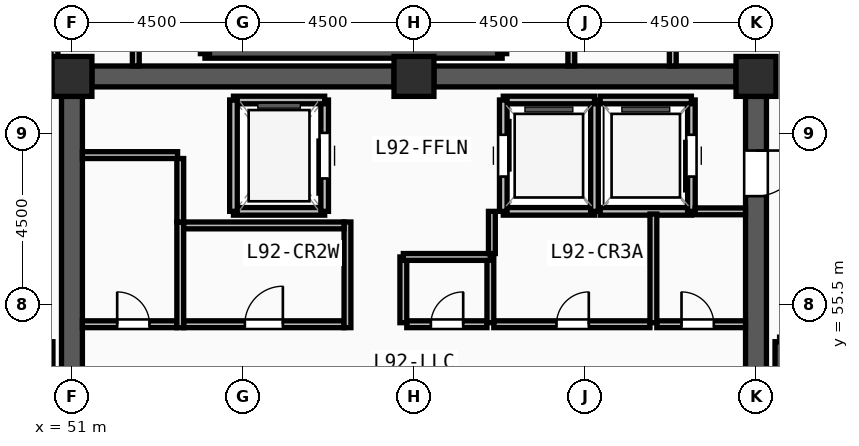
"""IFC4 building model, lengths in metres.
Left out: names, types, materials, properties, quantities, classifications, styles, units other than length and angle.
Written with IfcOpenShell. Run it as: python <this file> out.ifc"""

import sys

from ifc_helpers import new_model, si_unit, direction, frame, frame_2d, origin, origin_2d, place, context, subcontext, project, spatial, rectangle, extrude, source, transform, mapped, element, fill, save


model = new_model("IFC4")
c1 = context("Model", 3, precision=1e-05, world=origin(), true_north=direction((0.0, 1.0)))
c2 = subcontext(c1, "Body", "Model", "MODEL_VIEW")
j1 = project(units=[si_unit("LENGTHUNIT", "METRE"), si_unit("PLANEANGLEUNIT", "RADIAN")], contexts=[c1])
p1 = place(None, origin())
s1 = spatial("IfcSite", under=j1, at=p1, CompositionType="ELEMENT")
p2 = place(p1, origin())
s2 = spatial("IfcBuilding", under=s1, at=p2, CompositionType="ELEMENT")
p3 = place(p2, frame((0.0, 0.0, 355.8)))
s3 = spatial("IfcBuildingStorey", under=s2, at=p3, CompositionType="ELEMENT", Elevation=355.8)
m1 = source(origin(), c2, "Body", "SweptSolid", [
    extrude(rectangle(XDim=1.05, YDim=1.05, at=origin_2d()), origin(), (0.0, 0.0, 1.0), 4.8),
])
for number, where, z_axis, x_axis in (
    (1, (69.0, 61.5, 0.0), (0.0, 0.0, 1.0), (1.0, 0.0, 0.0)),
    (2, (60.0, 61.5, 0.0), (0.0, 0.0, 1.0), (1.0, 0.0, 0.0)),
    (3, (51.0, 61.5, 0.0), (0.0, 0.0, 1.0), (1.0, 0.0, 0.0)),
):
    element("IfcColumn", number, at=place(p3, frame(where, z_axis=z_axis, x_axis=x_axis)), inside=s3, PredefinedType="COLUMN", context=c2, shape_type="MappedRepresentation", body=[
        mapped(m1, transform((0.0, 0.0, 0.0), x_axis=(1.0, 0.0, 0.0), y_axis=(0.0, 1.0, 0.0), z_axis=(0.0, 0.0, 1.0), scale=1.0)),
    ])
for number, where, z_axis, x_axis in (
    (4, (51.525, 61.5, 0.0), (0.0, 0.0, 1.0), (1.0, 0.0, 0.0)),
    (5, (60.525, 61.5, 0.0), (0.0, 0.0, 1.0), (1.0, 0.0, 0.0)),
):
    element("IfcWall", number, at=place(p3, frame(where, z_axis=z_axis, x_axis=x_axis)), inside=s3, PredefinedType="SHEAR", context=c2, shape_type="SweptSolid", body=[
        extrude(rectangle(XDim=7.95, YDim=0.55, at=frame_2d((3.975, 0.0))), origin(), (0.0, 0.0, 1.0), 4.35),
    ])
p4 = place(p3, frame((69.0, 60.975, 0.0), z_axis=(0.0, 0.0, 1.0), x_axis=(0.0, -1.0, 0.0)))
e6 = element("IfcWall", 6, at=p4, inside=s3, PredefinedType="SHEAR", context=c2, shape_type="SweptSolid", body=[
    extrude(rectangle(XDim=13.95, YDim=0.55, at=frame_2d((6.975, 0.0))), origin(), (0.0, 0.0, 1.0), 4.35),
])
m2 = source(origin(), c2, "Body", "SweptSolid", [
    extrude(rectangle(XDim=1.2, YDim=2.2, at=frame_2d((0.6, 1.1))), frame((0.0, 0.285, 0.0), z_axis=(0.0, -1.0, 0.0), x_axis=(1.0, 0.0, 0.0)), (0.0, 0.0, 1.0), 0.57),
])
p5 = place(p4, frame((1.425, 0.0, 0.0)))
e7 = element("IfcOpeningElement", 7, at=p5, cuts=e6, PredefinedType="OPENING", context=c2, shape_type="MappedRepresentation", body=[
    mapped(m2, transform((0.0, 0.0, 0.0), x_axis=(1.0, 0.0, 0.0), y_axis=(0.0, 1.0, 0.0), z_axis=(0.0, 0.0, 1.0), scale=1.0)),
])
p6 = place(p3, frame((51.0, 47.025, 0.0), z_axis=(0.0, 0.0, 1.0), x_axis=(0.0, 1.0, 0.0)))
e8 = element("IfcWall", 8, at=p6, inside=s3, PredefinedType="SHEAR", context=c2, shape_type="SweptSolid", body=[
    extrude(rectangle(XDim=13.95, YDim=0.55, at=frame_2d((6.975, 0.0))), origin(), (0.0, 0.0, 1.0), 4.35),
])
for number, where, z_axis, x_axis in (
    (9, (50.38, 46.7, 0.0), (0.0, 0.0, 1.0), (0.0, 1.0, 0.0)),
    (10, (69.62, 54.52, 0.0), (0.0, 0.0, 1.0), (0.0, -1.0, 0.0)),
    (11, (54.5, 62.1, 0.0), (0.0, 0.0, 1.0), (1.0, 0.0, 0.0)),
):
    element("IfcWall", number, at=place(p3, frame(where, z_axis=z_axis, x_axis=x_axis)), inside=s3, PredefinedType="SOLIDWALL", context=c2, shape_type="SweptSolid", body=[
        extrude(rectangle(XDim=7.82, YDim=0.24, at=frame_2d((3.91, 0.0))), origin(), (0.0, 0.0, 1.0), 4.35),
    ])
for number, where, z_axis, x_axis in (
    (12, (62.32, 62.1, 0.0), (0.0, 0.0, 1.0), (0.0, 1.0, 0.0)),
    (13, (54.5, 65.54, 0.0), (0.0, 0.0, 1.0), (0.0, -1.0, 0.0)),
):
    element("IfcWall", number, at=place(p3, frame(where, z_axis=z_axis, x_axis=x_axis)), inside=s3, PredefinedType="SOLIDWALL", context=c2, shape_type="SweptSolid", body=[
        extrude(rectangle(XDim=3.44, YDim=0.24, at=frame_2d((1.72, 0.0))), origin(), (0.0, 0.0, 1.0), 4.35),
    ])
p7 = place(p3, frame((55.25, 57.95, 0.0), z_axis=(0.0, 0.0, 1.0), x_axis=(1.0, 0.0, 0.0)))
e14 = element("IfcWall", 14, at=p7, inside=s3, PredefinedType="SOLIDWALL", context=c2, shape_type="SweptSolid", body=[
    extrude(rectangle(XDim=2.4, YDim=0.2, at=frame_2d((1.2, 0.0))), origin(), (0.0, 0.0, 1.0), 4.35),
])
p8 = place(p3, frame((57.65, 57.95, 0.0), z_axis=(0.0, 0.0, 1.0), x_axis=(0.0, 1.0, 0.0)))
e15 = element("IfcWall", 15, at=p8, inside=s3, PredefinedType="SOLIDWALL", context=c2, shape_type="SweptSolid", body=[
    extrude(rectangle(XDim=2.93, YDim=0.2, at=frame_2d((1.465, 0.0))), origin(), (0.0, 0.0, 1.0), 4.35),
])
m3 = source(origin(), c2, "Body", "SweptSolid", [
    extrude(rectangle(XDim=1.2, YDim=2.3, at=frame_2d((0.6, 1.15))), frame((0.0, 0.11, 0.0), z_axis=(0.0, -1.0, 0.0), x_axis=(1.0, 0.0, 0.0)), (0.0, 0.0, 1.0), 0.22),
])
p9 = place(p8, frame((0.865, 0.0, 0.0)))
e16 = element("IfcOpeningElement", 16, at=p9, cuts=e15, PredefinedType="OPENING", context=c2, shape_type="MappedRepresentation", body=[
    mapped(m3, transform((0.0, 0.0, 0.0), x_axis=(1.0, 0.0, 0.0), y_axis=(0.0, 1.0, 0.0), z_axis=(0.0, 0.0, 1.0), scale=1.0)),
])
p10 = place(p3, frame((57.65, 60.88, 0.0), z_axis=(0.0, 0.0, 1.0), x_axis=(-1.0, 0.0, 0.0)))
e17 = element("IfcWall", 17, at=p10, inside=s3, PredefinedType="SOLIDWALL", context=c2, shape_type="SweptSolid", body=[
    extrude(rectangle(XDim=2.4, YDim=0.2, at=frame_2d((1.2, 0.0))), origin(), (0.0, 0.0, 1.0), 4.35),
])
p11 = place(p3, frame((55.25, 60.88, 0.0), z_axis=(0.0, 0.0, 1.0), x_axis=(0.0, -1.0, 0.0)))
e18 = element("IfcWall", 18, at=p11, inside=s3, PredefinedType="SOLIDWALL", context=c2, shape_type="SweptSolid", body=[
    extrude(rectangle(XDim=2.93, YDim=0.2, at=frame_2d((1.465, 0.0))), origin(), (0.0, 0.0, 1.0), 4.35),
])
p12 = place(p3, frame((62.35, 57.95, 0.0), z_axis=(0.0, 0.0, 1.0), x_axis=(1.0, 0.0, 0.0)))
e19 = element("IfcWall", 19, at=p12, inside=s3, PredefinedType="SOLIDWALL", context=c2, shape_type="SweptSolid", body=[
    extrude(rectangle(XDim=2.4, YDim=0.2, at=frame_2d((1.2, 0.0))), origin(), (0.0, 0.0, 1.0), 4.35),
])
p13 = place(p3, frame((64.75, 57.95, 0.0), z_axis=(0.0, 0.0, 1.0), x_axis=(0.0, 1.0, 0.0)))
e20 = element("IfcWall", 20, at=p13, inside=s3, PredefinedType="SOLIDWALL", context=c2, shape_type="SweptSolid", body=[
    extrude(rectangle(XDim=2.93, YDim=0.2, at=frame_2d((1.465, 0.0))), origin(), (0.0, 0.0, 1.0), 4.35),
])
p14 = place(p3, frame((64.75, 60.88, 0.0), z_axis=(0.0, 0.0, 1.0), x_axis=(-1.0, 0.0, 0.0)))
e21 = element("IfcWall", 21, at=p14, inside=s3, PredefinedType="SOLIDWALL", context=c2, shape_type="SweptSolid", body=[
    extrude(rectangle(XDim=2.4, YDim=0.2, at=frame_2d((1.2, 0.0))), origin(), (0.0, 0.0, 1.0), 4.35),
])
p15 = place(p3, frame((62.35, 60.88, 0.0), z_axis=(0.0, 0.0, 1.0), x_axis=(0.0, -1.0, 0.0)))
e22 = element("IfcWall", 22, at=p15, inside=s3, PredefinedType="SOLIDWALL", context=c2, shape_type="SweptSolid", body=[
    extrude(rectangle(XDim=2.93, YDim=0.2, at=frame_2d((1.465, 0.0))), origin(), (0.0, 0.0, 1.0), 4.35),
])
m4 = source(origin(), c2, "Body", "SweptSolid", [
    extrude(rectangle(XDim=1.1, YDim=2.2, at=frame_2d((0.55, 1.1))), frame((0.0, 0.11, 0.0), z_axis=(0.0, -1.0, 0.0), x_axis=(1.0, 0.0, 0.0)), (0.0, 0.0, 1.0), 0.22),
])
p16 = place(p15, frame((0.915, 0.0, 0.0)))
e23 = element("IfcOpeningElement", 23, at=p16, cuts=e22, PredefinedType="OPENING", context=c2, shape_type="MappedRepresentation", body=[
    mapped(m4, transform((0.0, 0.0, 0.0), x_axis=(1.0, 0.0, 0.0), y_axis=(0.0, 1.0, 0.0), z_axis=(0.0, 0.0, 1.0), scale=1.0)),
])
p17 = place(p3, frame((64.9, 57.95, 0.0), z_axis=(0.0, 0.0, 1.0), x_axis=(1.0, 0.0, 0.0)))
e24 = element("IfcWall", 24, at=p17, inside=s3, PredefinedType="SOLIDWALL", context=c2, shape_type="SweptSolid", body=[
    extrude(rectangle(XDim=2.4, YDim=0.2, at=frame_2d((1.2, 0.0))), origin(), (0.0, 0.0, 1.0), 4.35),
])
p18 = place(p3, frame((67.3, 57.95, 0.0), z_axis=(0.0, 0.0, 1.0), x_axis=(0.0, 1.0, 0.0)))
e25 = element("IfcWall", 25, at=p18, inside=s3, PredefinedType="SOLIDWALL", context=c2, shape_type="SweptSolid", body=[
    extrude(rectangle(XDim=2.93, YDim=0.2, at=frame_2d((1.465, 0.0))), origin(), (0.0, 0.0, 1.0), 4.35),
])
p19 = place(p18, frame((0.915, 0.0, 0.0)))
e26 = element("IfcOpeningElement", 26, at=p19, cuts=e25, PredefinedType="OPENING", context=c2, shape_type="MappedRepresentation", body=[
    mapped(m4, transform((0.0, 0.0, 0.0), x_axis=(1.0, 0.0, 0.0), y_axis=(0.0, 1.0, 0.0), z_axis=(0.0, 0.0, 1.0), scale=1.0)),
])
p20 = place(p3, frame((67.3, 60.88, 0.0), z_axis=(0.0, 0.0, 1.0), x_axis=(-1.0, 0.0, 0.0)))
e27 = element("IfcWall", 27, at=p20, inside=s3, PredefinedType="SOLIDWALL", context=c2, shape_type="SweptSolid", body=[
    extrude(rectangle(XDim=2.4, YDim=0.2, at=frame_2d((1.2, 0.0))), origin(), (0.0, 0.0, 1.0), 4.35),
])
p21 = place(p3, frame((53.94, 54.98, 0.0), z_axis=(0.0, 0.0, 1.0), x_axis=(1.0, 0.0, 0.0)))
e28 = element("IfcWall", 28, at=p21, inside=s3, PredefinedType="PARTITIONING", context=c2, shape_type="SweptSolid", body=[
    extrude(rectangle(XDim=4.22, YDim=0.18, at=frame_2d((2.11, 0.0))), origin(), (0.0, 0.0, 1.0), 4.35),
])
m5 = source(origin(), c2, "Body", "SweptSolid", [
    extrude(rectangle(XDim=1.0, YDim=2.2, at=frame_2d((0.5, 1.1))), frame((0.0, 0.1, 0.0), z_axis=(0.0, -1.0, 0.0), x_axis=(1.0, 0.0, 0.0)), (0.0, 0.0, 1.0), 0.2),
])
p22 = place(p21, frame((1.61, 0.0, 0.0)))
e29 = element("IfcOpeningElement", 29, at=p22, cuts=e28, PredefinedType="OPENING", context=c2, shape_type="MappedRepresentation", body=[
    mapped(m5, transform((0.0, 0.0, 0.0), x_axis=(1.0, 0.0, 0.0), y_axis=(0.0, 1.0, 0.0), z_axis=(0.0, 0.0, 1.0), scale=1.0)),
])
p23 = place(p3, frame((51.275, 54.98, 0.0), z_axis=(0.0, 0.0, 1.0), x_axis=(1.0, 0.0, 0.0)))
e30 = element("IfcWall", 30, at=p23, inside=s3, PredefinedType="PARTITIONING", context=c2, shape_type="SweptSolid", body=[
    extrude(rectangle(XDim=2.485, YDim=0.18, at=frame_2d((1.243, 0.0))), origin(), (0.0, 0.0, 1.0), 4.35),
])
m6 = source(origin(), c2, "Body", "SweptSolid", [
    extrude(rectangle(XDim=0.85, YDim=2.1, at=frame_2d((0.425, 1.05))), frame((0.0, 0.1, 0.0), z_axis=(0.0, -1.0, 0.0), x_axis=(1.0, 0.0, 0.0)), (0.0, 0.0, 1.0), 0.2),
])
p24 = place(p23, frame((0.915, 0.0, 0.0)))
e31 = element("IfcOpeningElement", 31, at=p24, cuts=e30, PredefinedType="OPENING", context=c2, shape_type="MappedRepresentation", body=[
    mapped(m6, transform((0.0, 0.0, 0.0), x_axis=(1.0, 0.0, 0.0), y_axis=(0.0, 1.0, 0.0), z_axis=(0.0, 0.0, 1.0), scale=1.0)),
])
p25 = place(p3, frame((62.1, 54.98, 0.0), z_axis=(0.0, 0.0, 1.0), x_axis=(1.0, 0.0, 0.0)))
e32 = element("IfcWall", 32, at=p25, inside=s3, PredefinedType="PARTITIONING", context=c2, shape_type="SweptSolid", body=[
    extrude(rectangle(XDim=4.11, YDim=0.18, at=frame_2d((2.055, 0.0))), origin(), (0.0, 0.0, 1.0), 4.35),
])
p26 = place(p25, frame((1.65, 0.0, 0.0)))
e33 = element("IfcOpeningElement", 33, at=p26, cuts=e32, PredefinedType="OPENING", context=c2, shape_type="MappedRepresentation", body=[
    mapped(m6, transform((0.0, 0.0, 0.0), x_axis=(1.0, 0.0, 0.0), y_axis=(0.0, 1.0, 0.0), z_axis=(0.0, 0.0, 1.0), scale=1.0)),
])
p27 = place(p3, frame((66.39, 54.98, 0.0), z_axis=(0.0, 0.0, 1.0), x_axis=(1.0, 0.0, 0.0)))
e34 = element("IfcWall", 34, at=p27, inside=s3, PredefinedType="PARTITIONING", context=c2, shape_type="SweptSolid", body=[
    extrude(rectangle(XDim=2.335, YDim=0.18, at=frame_2d((1.167, 0.0))), origin(), (0.0, 0.0, 1.0), 4.35),
])
p28 = place(p27, frame((0.65, 0.0, 0.0)))
e35 = element("IfcOpeningElement", 35, at=p28, cuts=e34, PredefinedType="OPENING", context=c2, shape_type="MappedRepresentation", body=[
    mapped(m6, transform((0.0, 0.0, 0.0), x_axis=(1.0, 0.0, 0.0), y_axis=(0.0, 1.0, 0.0), z_axis=(0.0, 0.0, 1.0), scale=1.0)),
])
p29 = place(p3, frame((59.81, 54.98, 0.0), z_axis=(0.0, 0.0, 1.0), x_axis=(1.0, 0.0, 0.0)))
e36 = element("IfcWall", 36, at=p29, inside=s3, PredefinedType="PARTITIONING", context=c2, shape_type="SweptSolid", body=[
    extrude(rectangle(XDim=2.11, YDim=0.18, at=frame_2d((1.055, 0.0))), origin(), (0.0, 0.0, 1.0), 4.35),
])
p30 = place(p29, frame((0.635, 0.0, 0.0)))
e37 = element("IfcOpeningElement", 37, at=p30, cuts=e36, PredefinedType="OPENING", context=c2, shape_type="MappedRepresentation", body=[
    mapped(m6, transform((0.0, 0.0, 0.0), x_axis=(1.0, 0.0, 0.0), y_axis=(0.0, 1.0, 0.0), z_axis=(0.0, 0.0, 1.0), scale=1.0)),
])
p31 = place(p3, frame((51.275, 59.43, 0.0), z_axis=(0.0, 0.0, 1.0), x_axis=(1.0, 0.0, 0.0)))
e38 = element("IfcWall", 38, at=p31, inside=s3, PredefinedType="PARTITIONING", context=c2, shape_type="SweptSolid", body=[
    extrude(rectangle(XDim=2.505, YDim=0.18, at=frame_2d((1.252, 0.0))), origin(), (0.0, 0.0, 1.0), 4.35),
])
p32 = place(p3, frame((66.3, 55.02, 0.0), z_axis=(0.0, 0.0, 1.0), x_axis=(0.0, 1.0, 0.0)))
e39 = element("IfcWall", 39, at=p32, inside=s3, PredefinedType="PARTITIONING", context=c2, shape_type="SweptSolid", body=[
    extrude(rectangle(XDim=2.86, YDim=0.18, at=frame_2d((1.43, 0.0))), origin(), (0.0, 0.0, 1.0), 4.35),
])
for number, where, z_axis, x_axis in (
    (40, (59.72, 55.02, 0.0), (0.0, 0.0, 1.0), (0.0, 1.0, 0.0)),
    (41, (62.01, 55.02, 0.0), (0.0, 0.0, 1.0), (0.0, 1.0, 0.0)),
):
    element("IfcWall", number, at=place(p3, frame(where, z_axis=z_axis, x_axis=x_axis)), inside=s3, PredefinedType="PARTITIONING", context=c2, shape_type="SweptSolid", body=[
        extrude(rectangle(XDim=1.73, YDim=0.18, at=frame_2d((0.865, 0.0))), origin(), (0.0, 0.0, 1.0), 4.35),
    ])
p33 = place(p3, frame((59.72, 56.75, 0.0), z_axis=(0.0, 0.0, 1.0), x_axis=(1.0, 0.0, 0.0)))
e42 = element("IfcWall", 42, at=p33, inside=s3, PredefinedType="PARTITIONING", context=c2, shape_type="SweptSolid", body=[
    extrude(rectangle(XDim=2.29, YDim=0.18, at=frame_2d((1.145, 0.0))), origin(), (0.0, 0.0, 1.0), 4.35),
])
p34 = place(p3, frame((50.54, 61.95, 0.0), z_axis=(0.0, 0.0, 1.0), x_axis=(0.0, 1.0, 0.0)))
e43 = element("IfcWall", 43, at=p34, inside=s3, PredefinedType="PARTITIONING", context=c2, shape_type="SweptSolid", body=[
    extrude(rectangle(XDim=3.63, YDim=0.18, at=frame_2d((1.815, 0.0))), origin(), (0.0, 0.0, 1.0), 4.35),
])
for number, where, z_axis, x_axis in (
    (44, (52.68, 61.775, 0.0), (0.0, 0.0, 1.0), (0.0, 1.0, 0.0)),
    (45, (64.14, 61.775, 0.0), (0.0, 0.0, 1.0), (0.0, 1.0, 0.0)),
    (46, (66.81, 61.775, 0.0), (0.0, 0.0, 1.0), (0.0, 1.0, 0.0)),
):
    element("IfcWall", number, at=place(p3, frame(where, z_axis=z_axis, x_axis=x_axis)), inside=s3, PredefinedType="PARTITIONING", context=c2, shape_type="SweptSolid", body=[
        extrude(rectangle(XDim=3.805, YDim=0.18, at=frame_2d((1.903, 0.0))), origin(), (0.0, 0.0, 1.0), 4.35),
    ])
for number, where, z_axis, x_axis in (
    (47, (53.85, 54.89, 0.0), (0.0, 0.0, 1.0), (0.0, 1.0, 0.0)),
    (48, (58.25, 54.89, 0.0), (0.0, 0.0, 1.0), (0.0, 1.0, 0.0)),
):
    element("IfcWall", number, at=place(p3, frame(where, z_axis=z_axis, x_axis=x_axis)), inside=s3, PredefinedType="PARTITIONING", context=c2, shape_type="SweptSolid", body=[
        extrude(rectangle(XDim=2.78, YDim=0.18, at=frame_2d((1.39, 0.0))), origin(), (0.0, 0.0, 1.0), 4.35),
    ])
p35 = place(p3, frame((53.94, 57.58, 0.0), z_axis=(0.0, 0.0, 1.0), x_axis=(1.0, 0.0, 0.0)))
e49 = element("IfcWall", 49, at=p35, inside=s3, PredefinedType="PARTITIONING", context=c2, shape_type="SweptSolid", body=[
    extrude(rectangle(XDim=4.22, YDim=0.18, at=frame_2d((2.11, 0.0))), origin(), (0.0, 0.0, 1.0), 4.35),
])
p36 = place(p3, frame((53.85, 57.67, 0.0), z_axis=(0.0, 0.0, 1.0), x_axis=(0.0, 1.0, 0.0)))
e50 = element("IfcWall", 50, at=p36, inside=s3, PredefinedType="PARTITIONING", context=c2, shape_type="SweptSolid", body=[
    extrude(rectangle(XDim=1.67, YDim=0.18, at=frame_2d((0.835, 0.0))), origin(), (0.0, 0.0, 1.0), 4.35),
])
p37 = place(p3, frame((62.05, 56.84, 0.0), z_axis=(0.0, 0.0, 1.0), x_axis=(0.0, 1.0, 0.0)))
e51 = element("IfcWall", 51, at=p37, inside=s3, PredefinedType="PARTITIONING", context=c2, shape_type="SweptSolid", body=[
    extrude(rectangle(XDim=1.11, YDim=0.18, at=frame_2d((0.555, 0.0))), origin(), (0.0, 0.0, 1.0), 4.35),
])
p38 = place(p3, frame((67.4, 57.95, 0.0), z_axis=(0.0, 0.0, 1.0), x_axis=(1.0, 0.0, 0.0)))
e52 = element("IfcWall", 52, at=p38, inside=s3, PredefinedType="PARTITIONING", context=c2, shape_type="SweptSolid", body=[
    extrude(rectangle(XDim=1.325, YDim=0.18, at=frame_2d((0.663, 0.0))), origin(), (0.0, 0.0, 1.0), 4.35),
])
m7 = source(origin(), c2, "Body", "SweptSolid", [
    extrude(rectangle(XDim=1.2, YDim=2.2, at=frame_2d((0.6, 1.1))), frame((0.0, 0.025, 0.0), z_axis=(0.0, -1.0, 0.0), x_axis=(1.0, 0.0, 0.0)), (0.0, 0.0, 1.0), 0.05),
])
p39 = place(p5, origin())
e53 = element("IfcDoor", 53, at=p39, inside=s3, OperationType="SINGLE_SWING_LEFT", PredefinedType="DOOR", context=c2, shape_type="MappedRepresentation", body=[
    mapped(m7, transform((0.0, 0.0, 0.0), x_axis=(1.0, 0.0, 0.0), y_axis=(0.0, 1.0, 0.0), z_axis=(0.0, 0.0, 1.0), scale=1.0)),
])
fill(e7, e53)
m8 = source(origin(), c2, "Body", "SweptSolid", [
    extrude(rectangle(XDim=1.2, YDim=2.3, at=frame_2d((0.6, 1.15))), frame((0.0, 0.025, 0.0), z_axis=(0.0, -1.0, 0.0), x_axis=(1.0, 0.0, 0.0)), (0.0, 0.0, 1.0), 0.05),
])
p40 = place(p9, origin())
e54 = element("IfcDoor", 54, at=p40, inside=s3, OperationType="SLIDING_TO_LEFT", PredefinedType="DOOR", context=c2, shape_type="MappedRepresentation", body=[
    mapped(m8, transform((0.0, 0.0, 0.0), x_axis=(1.0, 0.0, 0.0), y_axis=(0.0, 1.0, 0.0), z_axis=(0.0, 0.0, 1.0), scale=1.0)),
])
fill(e16, e54)
m9 = source(origin(), c2, "Body", "SweptSolid", [
    extrude(rectangle(XDim=1.1, YDim=2.2, at=frame_2d((0.55, 1.1))), frame((0.0, 0.025, 0.0), z_axis=(0.0, -1.0, 0.0), x_axis=(1.0, 0.0, 0.0)), (0.0, 0.0, 1.0), 0.05),
])
p41 = place(p16, origin())
e55 = element("IfcDoor", 55, at=p41, inside=s3, OperationType="SLIDING_TO_LEFT", PredefinedType="DOOR", context=c2, shape_type="MappedRepresentation", body=[
    mapped(m9, transform((0.0, 0.0, 0.0), x_axis=(1.0, 0.0, 0.0), y_axis=(0.0, 1.0, 0.0), z_axis=(0.0, 0.0, 1.0), scale=1.0)),
])
fill(e23, e55)
p42 = place(p19, origin())
e56 = element("IfcDoor", 56, at=p42, inside=s3, OperationType="SLIDING_TO_LEFT", PredefinedType="DOOR", context=c2, shape_type="MappedRepresentation", body=[
    mapped(m9, transform((0.0, 0.0, 0.0), x_axis=(1.0, 0.0, 0.0), y_axis=(0.0, 1.0, 0.0), z_axis=(0.0, 0.0, 1.0), scale=1.0)),
])
fill(e26, e56)
m10 = source(origin(), c2, "Body", "SweptSolid", [
    extrude(rectangle(XDim=1.0, YDim=2.2, at=frame_2d((0.5, 1.1))), frame((0.0, 0.025, 0.0), z_axis=(0.0, -1.0, 0.0), x_axis=(1.0, 0.0, 0.0)), (0.0, 0.0, 1.0), 0.05),
])
p43 = place(p22, origin())
e57 = element("IfcDoor", 57, at=p43, inside=s3, OperationType="SINGLE_SWING_RIGHT", PredefinedType="DOOR", context=c2, shape_type="MappedRepresentation", body=[
    mapped(m10, transform((0.0, 0.0, 0.0), x_axis=(1.0, 0.0, 0.0), y_axis=(0.0, 1.0, 0.0), z_axis=(0.0, 0.0, 1.0), scale=1.0)),
])
fill(e29, e57)
m11 = source(origin(), c2, "Body", "SweptSolid", [
    extrude(rectangle(XDim=0.85, YDim=2.1, at=frame_2d((0.425, 1.05))), frame((0.0, 0.025, 0.0), z_axis=(0.0, -1.0, 0.0), x_axis=(1.0, 0.0, 0.0)), (0.0, 0.0, 1.0), 0.05),
])
p44 = place(p24, origin())
e58 = element("IfcDoor", 58, at=p44, inside=s3, OperationType="SINGLE_SWING_LEFT", PredefinedType="DOOR", context=c2, shape_type="MappedRepresentation", body=[
    mapped(m11, transform((0.0, 0.0, 0.0), x_axis=(1.0, 0.0, 0.0), y_axis=(0.0, 1.0, 0.0), z_axis=(0.0, 0.0, 1.0), scale=1.0)),
])
fill(e31, e58)
p45 = place(p26, origin())
e59 = element("IfcDoor", 59, at=p45, inside=s3, OperationType="SINGLE_SWING_RIGHT", PredefinedType="DOOR", context=c2, shape_type="MappedRepresentation", body=[
    mapped(m11, transform((0.0, 0.0, 0.0), x_axis=(1.0, 0.0, 0.0), y_axis=(0.0, 1.0, 0.0), z_axis=(0.0, 0.0, 1.0), scale=1.0)),
])
fill(e33, e59)
p46 = place(p28, origin())
e60 = element("IfcDoor", 60, at=p46, inside=s3, OperationType="SINGLE_SWING_LEFT", PredefinedType="DOOR", context=c2, shape_type="MappedRepresentation", body=[
    mapped(m11, transform((0.0, 0.0, 0.0), x_axis=(1.0, 0.0, 0.0), y_axis=(0.0, 1.0, 0.0), z_axis=(0.0, 0.0, 1.0), scale=1.0)),
])
fill(e35, e60)
p47 = place(p30, origin())
e61 = element("IfcDoor", 61, at=p47, inside=s3, OperationType="SINGLE_SWING_RIGHT", PredefinedType="DOOR", context=c2, shape_type="MappedRepresentation", body=[
    mapped(m11, transform((0.0, 0.0, 0.0), x_axis=(1.0, 0.0, 0.0), y_axis=(0.0, 1.0, 0.0), z_axis=(0.0, 0.0, 1.0), scale=1.0)),
])
fill(e37, e61)
save(model, sys.argv[1])
